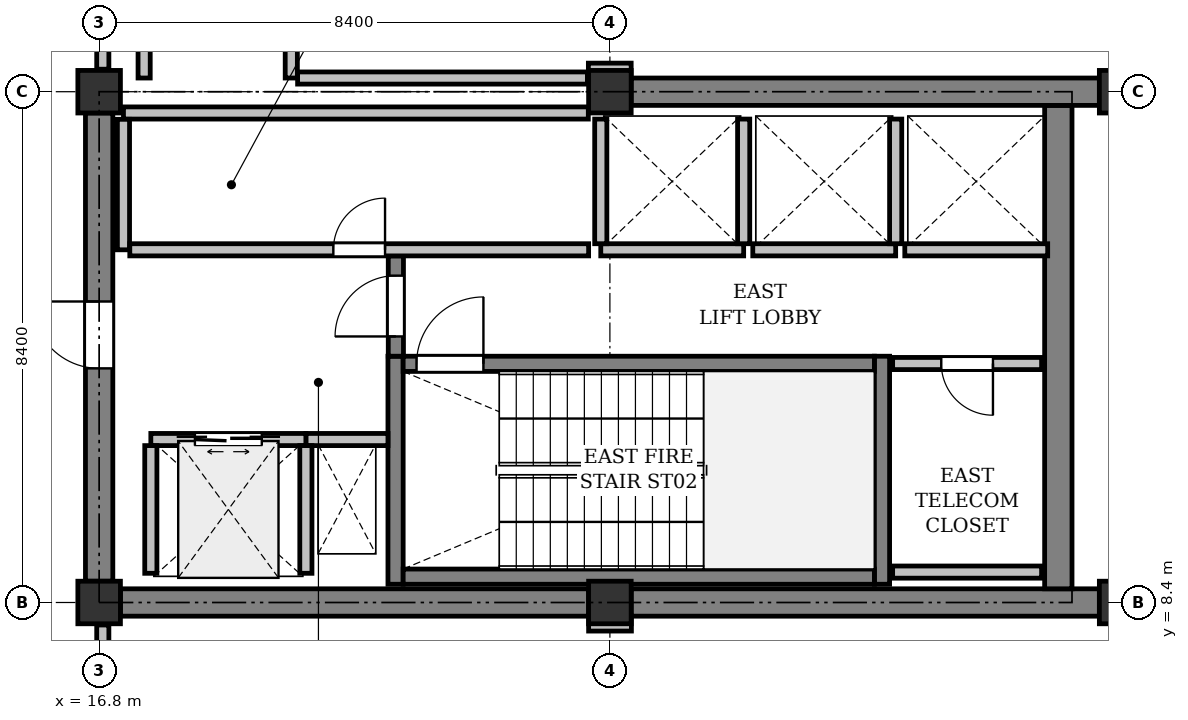
"""IFC4 building model, lengths in metres.
Left out: names, types, materials, properties, quantities, classifications, styles, units other than length and angle.
Written with IfcOpenShell. Run it as: python <this file> out.ifc"""

import sys

from ifc_helpers import new_model, si_unit, direction, frame, frame_2d, origin, origin_2d, place, context, subcontext, project, spatial, rectangle, extrude, element, fill, save


model = new_model("IFC4")
c1 = context("Model", 3, precision=1e-05, world=origin(), true_north=direction((0.0, 1.0)))
c2 = subcontext(c1, "Body", "Model", "MODEL_VIEW")
j1 = project(units=[si_unit("LENGTHUNIT", "METRE"), si_unit("PLANEANGLEUNIT", "RADIAN")], contexts=[c1])
p1 = place(None, origin())
s1 = spatial("IfcSite", under=j1, at=p1, CompositionType="ELEMENT")
p2 = place(p1, origin())
s2 = spatial("IfcBuilding", under=s1, at=p2, CompositionType="ELEMENT")
p3 = place(p2, frame((0.0, 0.0, 322.2)))
s3 = spatial("IfcBuildingStorey", under=s2, at=p3, CompositionType="ELEMENT", Elevation=322.2)
for number, where, z_axis, x_axis in (
    (1, (16.8, 8.4, 0.0), (0.0, 0.0, 1.0), (1.0, 0.0, 0.0)),
    (2, (16.8, 16.8, 0.0), (0.0, 0.0, 1.0), (1.0, 0.0, 0.0)),
    (3, (25.2, 8.4, 0.0), (0.0, 0.0, 1.0), (1.0, 0.0, 0.0)),
    (4, (25.2, 16.8, 0.0), (0.0, 0.0, 1.0), (1.0, 0.0, 0.0)),
    (5, (33.6, 8.4, 0.0), (0.0, 0.0, 1.0), (1.0, 0.0, 0.0)),
    (6, (33.6, 16.8, 0.0), (0.0, 0.0, 1.0), (1.0, 0.0, 0.0)),
):
    element("IfcColumn", number, at=place(p3, frame(where, z_axis=z_axis, x_axis=x_axis)), inside=s3, PredefinedType="COLUMN", context=c2, shape_type="SweptSolid", body=[
        extrude(rectangle(XDim=0.7, YDim=0.7, at=origin_2d()), origin(), (0.0, 0.0, 1.0), 4.8),
    ])
p4 = place(p3, frame((17.15, 8.4, 0.0), z_axis=(0.0, 0.0, 1.0), x_axis=(1.0, 0.0, 0.0)))
e7 = element("IfcWall", 7, at=p4, inside=s3, PredefinedType="SHEAR", context=c2, shape_type="SweptSolid", body=[
    extrude(rectangle(XDim=7.7, YDim=0.45, at=frame_2d((3.85, 0.0))), origin(), (0.0, 0.0, 1.0), 4.45),
])
p5 = place(p3, frame((25.55, 8.4, 0.0), z_axis=(0.0, 0.0, 1.0), x_axis=(1.0, 0.0, 0.0)))
e8 = element("IfcWall", 8, at=p5, inside=s3, PredefinedType="SHEAR", context=c2, shape_type="SweptSolid", body=[
    extrude(rectangle(XDim=7.7, YDim=0.45, at=frame_2d((3.85, 0.0))), origin(), (0.0, 0.0, 1.0), 4.45),
])
p6 = place(p3, frame((32.575, 8.625, 0.0), z_axis=(0.0, 0.0, 1.0), x_axis=(0.0, 1.0, 0.0)))
e9 = element("IfcWall", 9, at=p6, inside=s3, PredefinedType="SHEAR", context=c2, shape_type="SweptSolid", body=[
    extrude(rectangle(XDim=7.95, YDim=0.45, at=frame_2d((3.975, 0.0))), origin(), (0.0, 0.0, 1.0), 4.45),
])
p7 = place(p3, frame((16.8, 8.75, 0.0), z_axis=(0.0, 0.0, 1.0), x_axis=(0.0, 1.0, 0.0)))
e10 = element("IfcWall", 10, at=p7, inside=s3, PredefinedType="SHEAR", context=c2, shape_type="SweptSolid", body=[
    extrude(rectangle(XDim=7.7, YDim=0.45, at=frame_2d((3.85, 0.0))), origin(), (0.0, 0.0, 1.0), 4.45),
])
p8 = place(p7, frame((3.5, 0.0, 0.0)))
e11 = element("IfcOpeningElement", 11, at=p8, cuts=e10, PredefinedType="OPENING", context=c2, shape_type="SweptSolid", body=[
    extrude(rectangle(XDim=1.1, YDim=2.15, at=frame_2d((0.55, 1.075))), frame((0.0, 0.235, 0.0), z_axis=(0.0, -1.0, 0.0), x_axis=(1.0, 0.0, 0.0)), (0.0, 0.0, 1.0), 0.47),
])
p9 = place(p3, frame((25.55, 16.8, 0.0), z_axis=(0.0, 0.0, 1.0), x_axis=(1.0, 0.0, 0.0)))
e12 = element("IfcWall", 12, at=p9, inside=s3, PredefinedType="SHEAR", context=c2, shape_type="SweptSolid", body=[
    extrude(rectangle(XDim=7.7, YDim=0.45, at=frame_2d((3.85, 0.0))), origin(), (0.0, 0.0, 1.0), 4.45),
])
for number, where, z_axis, x_axis in (
    (13, (21.675, 8.7, 0.0), (0.0, 0.0, 1.0), (0.0, 1.0, 0.0)),
    (14, (29.675, 8.7, 0.0), (0.0, 0.0, 1.0), (0.0, 1.0, 0.0)),
):
    element("IfcWall", number, at=place(p3, frame(where, z_axis=z_axis, x_axis=x_axis)), inside=s3, PredefinedType="SHEAR", context=c2, shape_type="SweptSolid", body=[
        extrude(rectangle(XDim=3.75, YDim=0.25, at=frame_2d((1.875, 0.0))), origin(), (0.0, 0.0, 1.0), 4.45),
    ])
p10 = place(p3, frame((21.8, 8.825, 0.0), z_axis=(0.0, 0.0, 1.0), x_axis=(1.0, 0.0, 0.0)))
e15 = element("IfcWall", 15, at=p10, inside=s3, PredefinedType="SHEAR", context=c2, shape_type="SweptSolid", body=[
    extrude(rectangle(XDim=7.75, YDim=0.25, at=frame_2d((3.875, 0.0))), origin(), (0.0, 0.0, 1.0), 4.45),
])
p11 = place(p3, frame((21.8, 12.325, 0.0), z_axis=(0.0, 0.0, 1.0), x_axis=(1.0, 0.0, 0.0)))
e16 = element("IfcWall", 16, at=p11, inside=s3, PredefinedType="SHEAR", context=c2, shape_type="SweptSolid", body=[
    extrude(rectangle(XDim=7.75, YDim=0.25, at=frame_2d((3.875, 0.0))), origin(), (0.0, 0.0, 1.0), 4.45),
])
p12 = place(p11, frame((0.22, 0.0, 0.0)))
e17 = element("IfcOpeningElement", 17, at=p12, cuts=e16, PredefinedType="OPENING", context=c2, shape_type="SweptSolid", body=[
    extrude(rectangle(XDim=1.1, YDim=2.15, at=frame_2d((0.55, 1.075))), frame((0.0, 0.135, 0.0), z_axis=(0.0, -1.0, 0.0), x_axis=(1.0, 0.0, 0.0)), (0.0, 0.0, 1.0), 0.27),
])
p13 = place(p3, frame((20.2, 11.08, 0.0), z_axis=(0.0, 0.0, 1.0), x_axis=(1.0, 0.0, 0.0)))
e18 = element("IfcWall", 18, at=p13, inside=s3, PredefinedType="PARTITIONING", context=c2, shape_type="SweptSolid", body=[
    extrude(rectangle(XDim=1.35, YDim=0.2, at=frame_2d((0.675, 0.0))), origin(), (0.0, 0.0, 1.0), 4.45),
])
p14 = place(p3, frame((21.68, 12.45, 0.0), z_axis=(0.0, 0.0, 1.0), x_axis=(0.0, 1.0, 0.0)))
e19 = element("IfcWall", 19, at=p14, inside=s3, PredefinedType="SHEAR", context=c2, shape_type="SweptSolid", body=[
    extrude(rectangle(XDim=1.65, YDim=0.25, at=frame_2d((0.825, 0.0))), origin(), (0.0, 0.0, 1.0), 4.45),
])
p15 = place(p14, frame((0.325, 0.0, 0.0)))
e20 = element("IfcOpeningElement", 20, at=p15, cuts=e19, PredefinedType="OPENING", context=c2, shape_type="SweptSolid", body=[
    extrude(rectangle(XDim=1.0, YDim=2.15, at=frame_2d((0.5, 1.075))), frame((0.0, 0.135, 0.0), z_axis=(0.0, -1.0, 0.0), x_axis=(1.0, 0.0, 0.0)), (0.0, 0.0, 1.0), 0.27),
])
p16 = place(p3, frame((17.65, 11.08, 0.0), z_axis=(0.0, 0.0, 1.0), x_axis=(1.0, 0.0, 0.0)))
e21 = element("IfcWall", 21, at=p16, inside=s3, PredefinedType="PARTITIONING", context=c2, shape_type="SweptSolid", body=[
    extrude(rectangle(XDim=2.55, YDim=0.2, at=frame_2d((1.275, 0.0))), origin(), (0.0, 0.0, 1.0), 4.45),
])
p17 = place(p16, frame((0.725, 0.0, 0.0)))
e22 = element("IfcOpeningElement", 22, at=p17, cuts=e21, PredefinedType="OPENING", context=c2, shape_type="SweptSolid", body=[
    extrude(rectangle(XDim=1.1, YDim=2.2, at=frame_2d((0.55, 1.1))), frame((0.0, 0.11, 0.0), z_axis=(0.0, -1.0, 0.0), x_axis=(1.0, 0.0, 0.0)), (0.0, 0.0, 1.0), 0.22),
])
for number, where, z_axis, x_axis in (
    (23, (20.2, 8.88, 0.0), (0.0, 0.0, 1.0), (0.0, 1.0, 0.0)),
    (24, (17.65, 8.88, 0.0), (0.0, 0.0, 1.0), (0.0, 1.0, 0.0)),
):
    element("IfcWall", number, at=place(p3, frame(where, z_axis=z_axis, x_axis=x_axis)), inside=s3, PredefinedType="PARTITIONING", context=c2, shape_type="SweptSolid", body=[
        extrude(rectangle(XDim=2.1, YDim=0.2, at=frame_2d((1.05, 0.0))), origin(), (0.0, 0.0, 1.0), 4.45),
    ])
p18 = place(p3, frame((25.05, 14.2, 0.0), z_axis=(0.0, 0.0, 1.0), x_axis=(1.0, 0.0, 0.0)))
e25 = element("IfcWall", 25, at=p18, inside=s3, PredefinedType="PARTITIONING", context=c2, shape_type="SweptSolid", body=[
    extrude(rectangle(XDim=2.35, YDim=0.2, at=frame_2d((1.175, 0.0))), origin(), (0.0, 0.0, 1.0), 4.45),
])
for number, where, z_axis, x_axis in (
    (26, (27.4, 14.3, 0.0), (0.0, 0.0, 1.0), (0.0, 1.0, 0.0)),
    (27, (25.05, 14.3, 0.0), (0.0, 0.0, 1.0), (0.0, 1.0, 0.0)),
):
    element("IfcWall", number, at=place(p3, frame(where, z_axis=z_axis, x_axis=x_axis)), inside=s3, PredefinedType="PARTITIONING", context=c2, shape_type="SweptSolid", body=[
        extrude(rectangle(XDim=2.05, YDim=0.2, at=frame_2d((1.025, 0.0))), origin(), (0.0, 0.0, 1.0), 4.45),
    ])
p19 = place(p3, frame((27.55, 14.2, 0.0), z_axis=(0.0, 0.0, 1.0), x_axis=(1.0, 0.0, 0.0)))
e28 = element("IfcWall", 28, at=p19, inside=s3, PredefinedType="PARTITIONING", context=c2, shape_type="SweptSolid", body=[
    extrude(rectangle(XDim=2.35, YDim=0.2, at=frame_2d((1.175, 0.0))), origin(), (0.0, 0.0, 1.0), 4.45),
])
p20 = place(p3, frame((29.9, 14.3, 0.0), z_axis=(0.0, 0.0, 1.0), x_axis=(0.0, 1.0, 0.0)))
e29 = element("IfcWall", 29, at=p20, inside=s3, PredefinedType="PARTITIONING", context=c2, shape_type="SweptSolid", body=[
    extrude(rectangle(XDim=2.05, YDim=0.2, at=frame_2d((1.025, 0.0))), origin(), (0.0, 0.0, 1.0), 4.45),
])
p21 = place(p3, frame((30.05, 14.2, 0.0), z_axis=(0.0, 0.0, 1.0), x_axis=(1.0, 0.0, 0.0)))
e30 = element("IfcWall", 30, at=p21, inside=s3, PredefinedType="PARTITIONING", context=c2, shape_type="SweptSolid", body=[
    extrude(rectangle(XDim=2.35, YDim=0.2, at=frame_2d((1.175, 0.0))), origin(), (0.0, 0.0, 1.0), 4.45),
])
p22 = place(p3, frame((24.845, 16.45, 0.0), z_axis=(0.0, 0.0, 1.0), x_axis=(-1.0, 0.0, 0.0)))
e31 = element("IfcWall", 31, at=p22, inside=s3, PredefinedType="PARTITIONING", context=c2, shape_type="SweptSolid", body=[
    extrude(rectangle(XDim=7.645, YDim=0.2, at=frame_2d((3.823, 0.0))), origin(), (0.0, 0.0, 1.0), 4.45),
])
p23 = place(p3, frame((17.2, 16.346, 0.0), z_axis=(0.0, 0.0, 1.0), x_axis=(0.0, -1.0, 0.0)))
e32 = element("IfcWall", 32, at=p23, inside=s3, PredefinedType="PARTITIONING", context=c2, shape_type="SweptSolid", body=[
    extrude(rectangle(XDim=2.146, YDim=0.2, at=frame_2d((1.073, 0.0))), origin(), (0.0, 0.0, 1.0), 4.45),
])
p24 = place(p3, frame((17.304, 14.2, 0.0), z_axis=(0.0, 0.0, 1.0), x_axis=(1.0, 0.0, 0.0)))
e33 = element("IfcWall", 33, at=p24, inside=s3, PredefinedType="PARTITIONING", context=c2, shape_type="SweptSolid", body=[
    extrude(rectangle(XDim=7.546, YDim=0.2, at=frame_2d((3.773, 0.0))), origin(), (0.0, 0.0, 1.0), 4.45),
])
p25 = place(p24, frame((3.348, 0.0, 0.0)))
e34 = element("IfcOpeningElement", 34, at=p25, cuts=e33, PredefinedType="OPENING", context=c2, shape_type="SweptSolid", body=[
    extrude(rectangle(XDim=0.85, YDim=2.15, at=frame_2d((0.425, 1.075))), frame((0.0, 0.11, 0.0), z_axis=(0.0, -1.0, 0.0), x_axis=(1.0, 0.0, 0.0)), (0.0, 0.0, 1.0), 0.22),
])
p26 = place(p3, frame((32.3, 12.33, 0.0), z_axis=(0.0, 0.0, 1.0), x_axis=(-1.0, 0.0, 0.0)))
e35 = element("IfcWall", 35, at=p26, inside=s3, PredefinedType="PARTITIONING", context=c2, shape_type="SweptSolid", body=[
    extrude(rectangle(XDim=2.45, YDim=0.2, at=frame_2d((1.225, 0.0))), origin(), (0.0, 0.0, 1.0), 4.45),
])
p27 = place(p26, frame((0.8, 0.0, 0.0)))
e36 = element("IfcOpeningElement", 36, at=p27, cuts=e35, PredefinedType="OPENING", context=c2, shape_type="SweptSolid", body=[
    extrude(rectangle(XDim=0.85, YDim=2.15, at=frame_2d((0.425, 1.075))), frame((0.0, 0.11, 0.0), z_axis=(0.0, -1.0, 0.0), x_axis=(1.0, 0.0, 0.0)), (0.0, 0.0, 1.0), 0.22),
])
p28 = place(p3, frame((29.85, 8.9, 0.0), z_axis=(0.0, 0.0, 1.0), x_axis=(1.0, 0.0, 0.0)))
e37 = element("IfcWall", 37, at=p28, inside=s3, PredefinedType="PARTITIONING", context=c2, shape_type="SweptSolid", body=[
    extrude(rectangle(XDim=2.45, YDim=0.2, at=frame_2d((1.225, 0.0))), origin(), (0.0, 0.0, 1.0), 4.45),
])
p29 = place(p3, frame((19.96, 20.06, 0.0), z_axis=(0.0, 0.0, 1.0), x_axis=(0.0, -1.0, 0.0)))
e38 = element("IfcWall", 38, at=p29, inside=s3, PredefinedType="PARTITIONING", context=c2, shape_type="SweptSolid", body=[
    extrude(rectangle(XDim=3.035, YDim=0.2, at=frame_2d((1.518, 0.0))), origin(), (0.0, 0.0, 1.0), 4.45),
])
p30 = place(p3, frame((20.064, 17.025, 0.0), z_axis=(0.0, 0.0, 1.0), x_axis=(1.0, 0.0, 0.0)))
e39 = element("IfcWall", 39, at=p30, inside=s3, PredefinedType="PARTITIONING", context=c2, shape_type="SweptSolid", body=[
    extrude(rectangle(XDim=4.766, YDim=0.2, at=frame_2d((2.383, 0.0))), origin(), (0.0, 0.0, 1.0), 4.091),
])
for number, where, z_axis, x_axis in (
    (40, (24.846, 17.17, 0.0), (0.0, 0.0, 1.0), (1.0, 0.0, 0.0)),
    (41, (25.554, 8.031, 0.0), (0.0, 0.0, 1.0), (-1.0, -0.001, 0.0)),
):
    element("IfcWall", number, at=place(p3, frame(where, z_axis=z_axis, x_axis=x_axis)), inside=s3, PredefinedType="PARTITIONING", context=c2, shape_type="SweptSolid", body=[
        extrude(rectangle(XDim=0.704, YDim=0.2, at=frame_2d((0.352, 0.0))), origin(), (0.0, 0.0, 1.0), 4.143),
    ])
p31 = place(p3, frame((16.86, 8.03, 0.0), z_axis=(0.0, 0.0, 1.0), x_axis=(0.0, -1.0, 0.0)))
e42 = element("IfcWall", 42, at=p31, inside=s3, PredefinedType="PARTITIONING", context=c2, shape_type="SweptSolid", body=[
    extrude(rectangle(XDim=2.63, YDim=0.2, at=frame_2d((1.315, 0.0))), origin(), (0.0, 0.0, 1.0), 4.143),
])
p32 = place(p3, frame((16.86, 19.6, 0.0), z_axis=(0.0, 0.0, 1.0), x_axis=(0.0, -1.0, 0.0)))
e43 = element("IfcWall", 43, at=p32, inside=s3, PredefinedType="PARTITIONING", context=c2, shape_type="SweptSolid", body=[
    extrude(rectangle(XDim=2.43, YDim=0.2, at=frame_2d((1.215, 0.0))), origin(), (0.0, 0.0, 1.0), 4.143),
])
p33 = place(p3, frame((17.54, 17.025, 0.0), z_axis=(0.0, 0.0, 1.0), x_axis=(0.0, 1.0, 0.0)))
e44 = element("IfcWall", 44, at=p33, inside=s3, PredefinedType="PARTITIONING", context=c2, shape_type="SweptSolid", body=[
    extrude(rectangle(XDim=3.139, YDim=0.2, at=frame_2d((1.57, 0.0))), origin(), (0.0, 0.0, 1.0), 4.45),
])
p34 = place(p8, origin())
e45 = element("IfcDoor", 45, at=p34, inside=s3, OperationType="SINGLE_SWING_RIGHT", PredefinedType="DOOR", context=c2, shape_type="SweptSolid", body=[
    extrude(rectangle(XDim=1.1, YDim=2.15, at=frame_2d((0.55, 1.075))), frame((0.0, 0.025, 0.0), z_axis=(0.0, -1.0, 0.0), x_axis=(1.0, 0.0, 0.0)), (0.0, 0.0, 1.0), 0.05),
])
fill(e11, e45)
p35 = place(p12, origin())
e46 = element("IfcDoor", 46, at=p35, inside=s3, OperationType="SINGLE_SWING_RIGHT", PredefinedType="DOOR", context=c2, shape_type="SweptSolid", body=[
    extrude(rectangle(XDim=1.1, YDim=2.15, at=frame_2d((0.55, 1.075))), frame((0.0, 0.025, 0.0), z_axis=(0.0, -1.0, 0.0), x_axis=(1.0, 0.0, 0.0)), (0.0, 0.0, 1.0), 0.05),
])
fill(e17, e46)
p36 = place(p15, origin())
e47 = element("IfcDoor", 47, at=p36, inside=s3, OperationType="SINGLE_SWING_LEFT", PredefinedType="DOOR", context=c2, shape_type="SweptSolid", body=[
    extrude(rectangle(XDim=1.0, YDim=2.15, at=frame_2d((0.5, 1.075))), frame((0.0, 0.025, 0.0), z_axis=(0.0, -1.0, 0.0), x_axis=(1.0, 0.0, 0.0)), (0.0, 0.0, 1.0), 0.05),
])
fill(e20, e47)
p37 = place(p17, origin())
e48 = element("IfcDoor", 48, at=p37, inside=s3, OperationType="DOUBLE_DOOR_SLIDING", PredefinedType="DOOR", context=c2, shape_type="SweptSolid", body=[
    extrude(rectangle(XDim=1.1, YDim=2.2, at=frame_2d((0.55, 1.1))), frame((0.0, 0.025, 0.0), z_axis=(0.0, -1.0, 0.0), x_axis=(1.0, 0.0, 0.0)), (0.0, 0.0, 1.0), 0.05),
])
fill(e22, e48)
p38 = place(p25, origin())
e49 = element("IfcDoor", 49, at=p38, inside=s3, OperationType="SINGLE_SWING_RIGHT", PredefinedType="DOOR", context=c2, shape_type="SweptSolid", body=[
    extrude(rectangle(XDim=0.85, YDim=2.15, at=frame_2d((0.425, 1.075))), frame((0.0, 0.025, 0.0), z_axis=(0.0, -1.0, 0.0), x_axis=(1.0, 0.0, 0.0)), (0.0, 0.0, 1.0), 0.05),
])
fill(e34, e49)
p39 = place(p27, origin())
e50 = element("IfcDoor", 50, at=p39, inside=s3, OperationType="SINGLE_SWING_LEFT", PredefinedType="DOOR", context=c2, shape_type="SweptSolid", body=[
    extrude(rectangle(XDim=0.85, YDim=2.15, at=frame_2d((0.425, 1.075))), frame((0.0, 0.025, 0.0), z_axis=(0.0, -1.0, 0.0), x_axis=(1.0, 0.0, 0.0)), (0.0, 0.0, 1.0), 0.05),
])
fill(e36, e50)
save(model, sys.argv[1])
